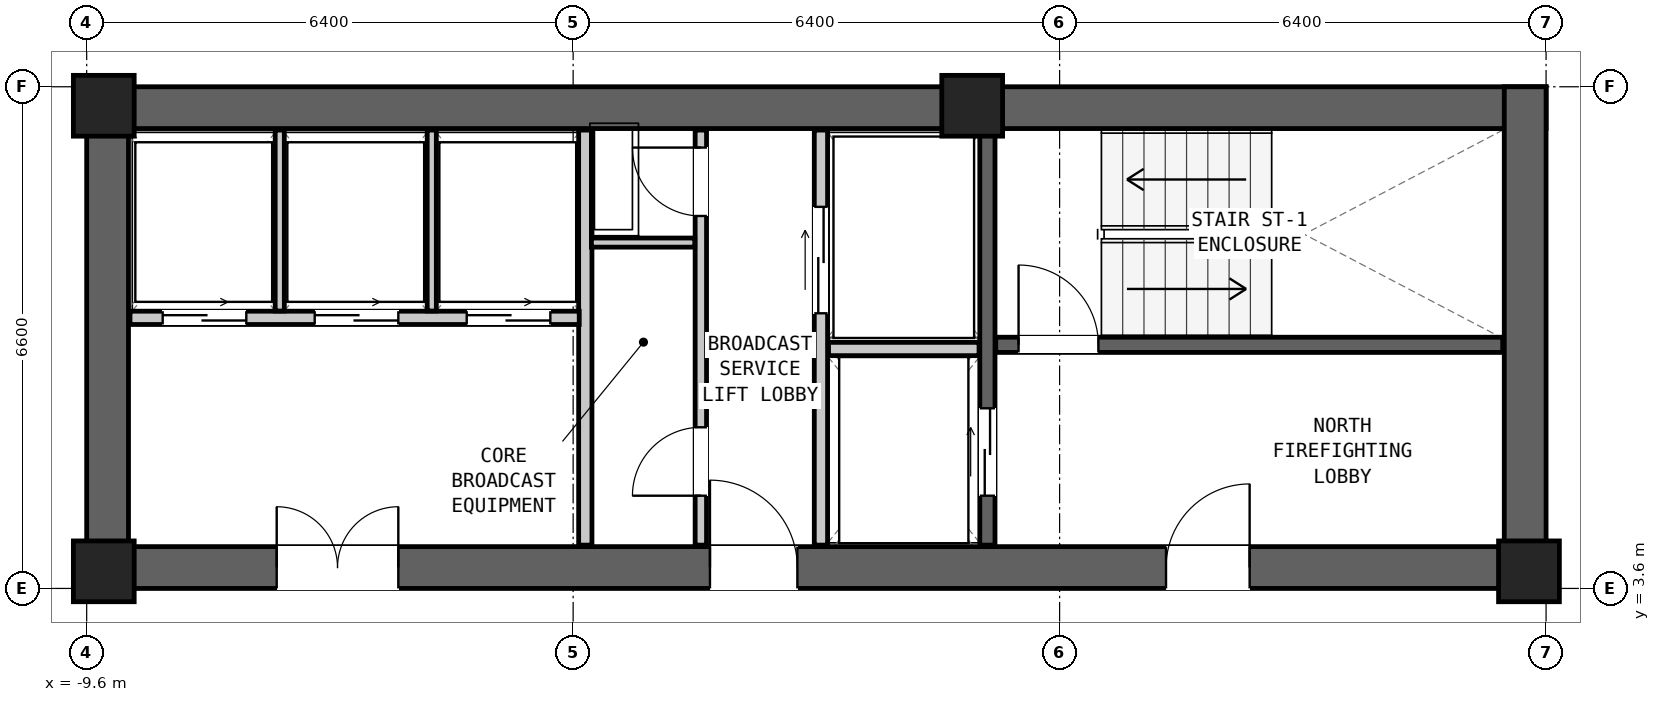
"""IFC4 building model, lengths in metres.
Left out: names, types, materials, properties, quantities, classifications, styles, units other than length and angle.
Written with IfcOpenShell. Run it as: python <this file> out.ifc"""

import sys

from ifc_helpers import new_model, si_unit, direction, frame, frame_2d, origin, origin_2d, place, context, subcontext, project, spatial, rectangle, extrude, element, fill, save


model = new_model("IFC4")
c1 = context("Model", 3, precision=1e-05, world=origin(), true_north=direction((0.0, 1.0)))
c2 = subcontext(c1, "Body", "Model", "MODEL_VIEW")
j1 = project(units=[si_unit("LENGTHUNIT", "METRE"), si_unit("PLANEANGLEUNIT", "RADIAN")], contexts=[c1])
p1 = place(None, origin())
s1 = spatial("IfcSite", under=j1, at=p1, CompositionType="ELEMENT")
p2 = place(p1, origin())
s2 = spatial("IfcBuilding", under=s1, at=p2, CompositionType="ELEMENT")
p3 = place(p2, frame((0.0, 0.0, 78.6)))
s3 = spatial("IfcBuildingStorey", under=s2, at=p3, CompositionType="ELEMENT", Elevation=78.6)
p4 = place(p3, frame((-9.6, 9.925, 0.0), z_axis=(0.0, 0.0, 1.0), x_axis=(1.0, 0.0, 0.0)))
e1 = element("IfcWall", 1, at=p4, inside=s3, PredefinedType="SHEAR", context=c2, shape_type="SweptSolid", body=[
    extrude(rectangle(XDim=19.2, YDim=0.55, at=frame_2d((9.6, 0.0))), origin(), (0.0, 0.0, 1.0), 3.05),
])
p5 = place(p3, frame((-9.6, 3.875, 0.0), z_axis=(0.0, 0.0, 1.0), x_axis=(1.0, 0.0, 0.0)))
e2 = element("IfcWall", 2, at=p5, inside=s3, PredefinedType="SHEAR", context=c2, shape_type="SweptSolid", body=[
    extrude(rectangle(XDim=19.2, YDim=0.55, at=frame_2d((9.6, 0.0))), origin(), (0.0, 0.0, 1.0), 3.05),
])
p6 = place(p5, frame((14.2, 0.0, 0.0)))
e3 = element("IfcOpeningElement", 3, at=p6, cuts=e2, PredefinedType="OPENING", context=c2, shape_type="SweptSolid", body=[
    extrude(rectangle(XDim=1.1, YDim=2.08, at=frame_2d((0.55, 1.04))), frame((0.0, 0.287, 0.0), z_axis=(0.0, -1.0, 0.0), x_axis=(1.0, 0.0, 0.0)), (0.0, 0.0, 1.0), 0.574),
])
p7 = place(p5, frame((8.2, 0.0, 0.0)))
e4 = element("IfcOpeningElement", 4, at=p7, cuts=e2, PredefinedType="OPENING", context=c2, shape_type="SweptSolid", body=[
    extrude(rectangle(XDim=1.15, YDim=2.1, at=frame_2d((0.575, 1.05))), frame((0.0, 0.287, 0.0), z_axis=(0.0, -1.0, 0.0), x_axis=(1.0, 0.0, 0.0)), (0.0, 0.0, 1.0), 0.574),
])
p8 = place(p5, frame((2.5, 0.0, 0.0)))
e5 = element("IfcOpeningElement", 5, at=p8, cuts=e2, PredefinedType="OPENING", context=c2, shape_type="SweptSolid", body=[
    extrude(rectangle(XDim=1.6, YDim=2.12, at=frame_2d((0.8, 1.06))), frame((0.0, 0.287, 0.0), z_axis=(0.0, -1.0, 0.0), x_axis=(1.0, 0.0, 0.0)), (0.0, 0.0, 1.0), 0.574),
])
for number, where, z_axis, x_axis in (
    (6, (-9.325, 3.6, 0.0), (0.0, 0.0, 1.0), (0.0, 1.0, 0.0)),
    (7, (9.325, 3.6, 0.0), (0.0, 0.0, 1.0), (0.0, 1.0, 0.0)),
):
    element("IfcWall", number, at=place(p3, frame(where, z_axis=z_axis, x_axis=x_axis)), inside=s3, PredefinedType="SHEAR", context=c2, shape_type="SweptSolid", body=[
        extrude(rectangle(XDim=6.6, YDim=0.55, at=frame_2d((3.3, 0.0))), origin(), (0.0, 0.0, 1.0), 3.05),
    ])
for number, where, z_axis, x_axis in (
    (8, (-9.375, 9.95, 0.0), (0.0, 0.0, 1.0), (1.0, 0.0, 0.0)),
    (9, (2.05, 9.95, 0.0), (0.0, 0.0, 1.0), (1.0, 0.0, 0.0)),
    (10, (-9.375, 3.825, 0.0), (0.0, 0.0, 1.0), (1.0, 0.0, 0.0)),
    (11, (9.375, 3.825, 0.0), (0.0, 0.0, 1.0), (1.0, 0.0, 0.0)),
):
    element("IfcColumn", number, at=place(p3, frame(where, z_axis=z_axis, x_axis=x_axis)), inside=s3, PredefinedType="COLUMN", context=c2, shape_type="SweptSolid", body=[
        extrude(rectangle(XDim=0.8, YDim=0.8, at=origin_2d()), origin(), (0.0, 0.0, 1.0), 3.05),
    ])
p9 = place(p3, frame((2.36, 6.805, 0.0), z_axis=(0.0, 0.0, 1.0), x_axis=(1.0, 0.0, 0.0)))
e12 = element("IfcWall", 12, at=p9, inside=s3, PredefinedType="SHEAR", context=c2, shape_type="SweptSolid", body=[
    extrude(rectangle(XDim=6.67, YDim=0.2, at=frame_2d((3.335, 0.0))), origin(), (0.0, 0.0, 1.0), 2.83),
])
p10 = place(p9, frame((0.3, 0.0, 0.0)))
e13 = element("IfcOpeningElement", 13, at=p10, cuts=e12, PredefinedType="OPENING", context=c2, shape_type="SweptSolid", body=[
    extrude(rectangle(XDim=1.05, YDim=2.08, at=frame_2d((0.525, 1.04))), frame((0.0, 0.112, 0.0), z_axis=(0.0, -1.0, 0.0), x_axis=(1.0, 0.0, 0.0)), (0.0, 0.0, 1.0), 0.224),
])
p11 = place(p3, frame((2.25, 4.17, 0.0), z_axis=(0.0, 0.0, 1.0), x_axis=(0.0, 1.0, 0.0)))
e14 = element("IfcWall", 14, at=p11, inside=s3, PredefinedType="SHEAR", context=c2, shape_type="SweptSolid", body=[
    extrude(rectangle(XDim=5.46, YDim=0.2, at=frame_2d((2.73, 0.0))), origin(), (0.0, 0.0, 1.0), 2.83),
])
p12 = place(p11, frame((0.65, 0.0, 0.0)))
e15 = element("IfcOpeningElement", 15, at=p12, cuts=e14, PredefinedType="OPENING", context=c2, shape_type="SweptSolid", body=[
    extrude(rectangle(XDim=1.15, YDim=2.08, at=frame_2d((0.575, 1.04))), frame((0.0, 0.112, 0.0), z_axis=(0.0, -1.0, 0.0), x_axis=(1.0, 0.0, 0.0)), (0.0, 0.0, 1.0), 0.224),
])
p13 = place(p3, frame((0.06, 4.17, 0.0), z_axis=(0.0, 0.0, 1.0), x_axis=(0.0, 1.0, 0.0)))
e16 = element("IfcWall", 16, at=p13, inside=s3, PredefinedType="PARTITIONING", context=c2, shape_type="SweptSolid", body=[
    extrude(rectangle(XDim=5.46, YDim=0.175, at=frame_2d((2.73, 0.0))), origin(), (0.0, 0.0, 1.0), 2.83),
])
p14 = place(p13, frame((3.05, 0.0, 0.0)))
e17 = element("IfcOpeningElement", 17, at=p14, cuts=e16, PredefinedType="OPENING", context=c2, shape_type="SweptSolid", body=[
    extrude(rectangle(XDim=1.4, YDim=2.12, at=frame_2d((0.7, 1.06))), frame((0.0, 0.1, 0.0), z_axis=(0.0, -1.0, 0.0), x_axis=(1.0, 0.0, 0.0)), (0.0, 0.0, 1.0), 0.199),
])
p15 = place(p3, frame((0.16, 6.75, 0.0), z_axis=(0.0, 0.0, 1.0), x_axis=(1.0, 0.0, 0.0)))
e18 = element("IfcWall", 18, at=p15, inside=s3, PredefinedType="PARTITIONING", context=c2, shape_type="SweptSolid", body=[
    extrude(rectangle(XDim=1.98, YDim=0.175, at=frame_2d((0.99, 0.0))), origin(), (0.0, 0.0, 1.0), 2.83),
])
p16 = place(p3, frame((-3.04, 4.17, 0.0), z_axis=(0.0, 0.0, 1.0), x_axis=(0.0, 1.0, 0.0)))
e19 = element("IfcWall", 19, at=p16, inside=s3, PredefinedType="PARTITIONING", context=c2, shape_type="SweptSolid", body=[
    extrude(rectangle(XDim=5.46, YDim=0.175, at=frame_2d((2.73, 0.0))), origin(), (0.0, 0.0, 1.0), 2.83),
])
p17 = place(p3, frame((-1.52, 4.17, 0.0), z_axis=(0.0, 0.0, 1.0), x_axis=(0.0, 1.0, 0.0)))
e20 = element("IfcWall", 20, at=p17, inside=s3, PredefinedType="PARTITIONING", context=c2, shape_type="SweptSolid", body=[
    extrude(rectangle(XDim=5.46, YDim=0.15, at=frame_2d((2.73, 0.0))), origin(), (0.0, 0.0, 1.0), 2.83),
])
p18 = place(p17, frame((4.33, 0.0, 0.0)))
e21 = element("IfcOpeningElement", 21, at=p18, cuts=e20, PredefinedType="OPENING", context=c2, shape_type="SweptSolid", body=[
    extrude(rectangle(XDim=0.9, YDim=2.05, at=frame_2d((0.45, 1.025))), frame((0.0, 0.087, 0.0), z_axis=(0.0, -1.0, 0.0), x_axis=(1.0, 0.0, 0.0)), (0.0, 0.0, 1.0), 0.174),
])
p19 = place(p17, frame((0.65, 0.0, 0.0)))
e22 = element("IfcOpeningElement", 22, at=p19, cuts=e20, PredefinedType="OPENING", context=c2, shape_type="SweptSolid", body=[
    extrude(rectangle(XDim=0.9, YDim=2.05, at=frame_2d((0.45, 1.025))), frame((0.0, 0.087, 0.0), z_axis=(0.0, -1.0, 0.0), x_axis=(1.0, 0.0, 0.0)), (0.0, 0.0, 1.0), 0.174),
])
p20 = place(p3, frame((-2.96, 8.15, 0.0), z_axis=(0.0, 0.0, 1.0), x_axis=(1.0, 0.0, 0.0)))
e23 = element("IfcWall", 23, at=p20, inside=s3, PredefinedType="PARTITIONING", context=c2, shape_type="SweptSolid", body=[
    extrude(rectangle(XDim=1.36, YDim=0.12, at=frame_2d((0.68, 0.0))), origin(), (0.0, 0.0, 1.0), 2.83),
])
p21 = place(p3, frame((-9.03, 7.16, 0.0), z_axis=(0.0, 0.0, 1.0), x_axis=(1.0, 0.0, 0.0)))
e24 = element("IfcWall", 24, at=p21, inside=s3, PredefinedType="PARTITIONING", context=c2, shape_type="SweptSolid", body=[
    extrude(rectangle(XDim=5.91, YDim=0.175, at=frame_2d((2.955, 0.0))), origin(), (0.0, 0.0, 1.0), 2.83),
])
p22 = place(p21, frame((0.43, 0.0, 0.0)))
e25 = element("IfcOpeningElement", 25, at=p22, cuts=e24, PredefinedType="OPENING", context=c2, shape_type="SweptSolid", body=[
    extrude(rectangle(XDim=1.1, YDim=2.06, at=frame_2d((0.55, 1.03))), frame((0.0, 0.1, 0.0), z_axis=(0.0, -1.0, 0.0), x_axis=(1.0, 0.0, 0.0)), (0.0, 0.0, 1.0), 0.199),
])
p23 = place(p21, frame((2.43, 0.0, 0.0)))
e26 = element("IfcOpeningElement", 26, at=p23, cuts=e24, PredefinedType="OPENING", context=c2, shape_type="SweptSolid", body=[
    extrude(rectangle(XDim=1.1, YDim=2.06, at=frame_2d((0.55, 1.03))), frame((0.0, 0.1, 0.0), z_axis=(0.0, -1.0, 0.0), x_axis=(1.0, 0.0, 0.0)), (0.0, 0.0, 1.0), 0.199),
])
p24 = place(p21, frame((4.43, 0.0, 0.0)))
e27 = element("IfcOpeningElement", 27, at=p24, cuts=e24, PredefinedType="OPENING", context=c2, shape_type="SweptSolid", body=[
    extrude(rectangle(XDim=1.1, YDim=2.06, at=frame_2d((0.55, 1.03))), frame((0.0, 0.1, 0.0), z_axis=(0.0, -1.0, 0.0), x_axis=(1.0, 0.0, 0.0)), (0.0, 0.0, 1.0), 0.199),
])
for number, where, z_axis, x_axis in (
    (28, (-7.06, 7.25, 0.0), (0.0, 0.0, 1.0), (0.0, 1.0, 0.0)),
    (29, (-5.06, 7.25, 0.0), (0.0, 0.0, 1.0), (0.0, 1.0, 0.0)),
):
    element("IfcWall", number, at=place(p3, frame(where, z_axis=z_axis, x_axis=x_axis)), inside=s3, PredefinedType="PARTITIONING", context=c2, shape_type="SweptSolid", body=[
        extrude(rectangle(XDim=2.38, YDim=0.12, at=frame_2d((1.19, 0.0))), origin(), (0.0, 0.0, 1.0), 2.83),
    ])
p25 = place(p10, origin())
e30 = element("IfcDoor", 30, at=p25, inside=s3, OperationType="SINGLE_SWING_LEFT", PredefinedType="DOOR", context=c2, shape_type="SweptSolid", body=[
    extrude(rectangle(XDim=1.05, YDim=2.08, at=frame_2d((0.525, 1.04))), frame((0.0, 0.025, 0.0), z_axis=(0.0, -1.0, 0.0), x_axis=(1.0, 0.0, 0.0)), (0.0, 0.0, 1.0), 0.05),
])
fill(e13, e30)
p26 = place(p6, origin())
e31 = element("IfcDoor", 31, at=p26, inside=s3, OperationType="SINGLE_SWING_RIGHT", PredefinedType="DOOR", context=c2, shape_type="SweptSolid", body=[
    extrude(rectangle(XDim=1.1, YDim=2.08, at=frame_2d((0.55, 1.04))), frame((0.0, 0.025, 0.0), z_axis=(0.0, -1.0, 0.0), x_axis=(1.0, 0.0, 0.0)), (0.0, 0.0, 1.0), 0.05),
])
fill(e3, e31)
p27 = place(p12, origin())
e32 = element("IfcDoor", 32, at=p27, inside=s3, OperationType="DOUBLE_DOOR_SLIDING", PredefinedType="DOOR", context=c2, shape_type="SweptSolid", body=[
    extrude(rectangle(XDim=1.15, YDim=2.08, at=frame_2d((0.575, 1.04))), frame((0.0, 0.025, 0.0), z_axis=(0.0, -1.0, 0.0), x_axis=(1.0, 0.0, 0.0)), (0.0, 0.0, 1.0), 0.05),
])
fill(e15, e32)
p28 = place(p14, origin())
e33 = element("IfcDoor", 33, at=p28, inside=s3, OperationType="DOUBLE_DOOR_SLIDING", PredefinedType="DOOR", context=c2, shape_type="SweptSolid", body=[
    extrude(rectangle(XDim=1.4, YDim=2.12, at=frame_2d((0.7, 1.06))), frame((0.0, 0.025, 0.0), z_axis=(0.0, -1.0, 0.0), x_axis=(1.0, 0.0, 0.0)), (0.0, 0.0, 1.0), 0.05),
])
fill(e17, e33)
p29 = place(p7, origin())
e34 = element("IfcDoor", 34, at=p29, inside=s3, OperationType="SINGLE_SWING_LEFT", PredefinedType="DOOR", context=c2, shape_type="SweptSolid", body=[
    extrude(rectangle(XDim=1.15, YDim=2.1, at=frame_2d((0.575, 1.05))), frame((0.0, 0.025, 0.0), z_axis=(0.0, -1.0, 0.0), x_axis=(1.0, 0.0, 0.0)), (0.0, 0.0, 1.0), 0.05),
])
fill(e4, e34)
p30 = place(p18, origin())
e35 = element("IfcDoor", 35, at=p30, inside=s3, OperationType="SINGLE_SWING_RIGHT", PredefinedType="DOOR", context=c2, shape_type="SweptSolid", body=[
    extrude(rectangle(XDim=0.9, YDim=2.05, at=frame_2d((0.45, 1.025))), frame((0.0, 0.025, 0.0), z_axis=(0.0, -1.0, 0.0), x_axis=(1.0, 0.0, 0.0)), (0.0, 0.0, 1.0), 0.05),
])
fill(e21, e35)
p31 = place(p19, origin())
e36 = element("IfcDoor", 36, at=p31, inside=s3, OperationType="SINGLE_SWING_LEFT", PredefinedType="DOOR", context=c2, shape_type="SweptSolid", body=[
    extrude(rectangle(XDim=0.9, YDim=2.05, at=frame_2d((0.45, 1.025))), frame((0.0, 0.025, 0.0), z_axis=(0.0, -1.0, 0.0), x_axis=(1.0, 0.0, 0.0)), (0.0, 0.0, 1.0), 0.05),
])
fill(e22, e36)
p32 = place(p22, origin())
e37 = element("IfcDoor", 37, at=p32, inside=s3, OperationType="DOUBLE_DOOR_SLIDING", PredefinedType="DOOR", context=c2, shape_type="SweptSolid", body=[
    extrude(rectangle(XDim=1.1, YDim=2.06, at=frame_2d((0.55, 1.03))), frame((0.0, 0.025, 0.0), z_axis=(0.0, -1.0, 0.0), x_axis=(1.0, 0.0, 0.0)), (0.0, 0.0, 1.0), 0.05),
])
fill(e25, e37)
p33 = place(p23, origin())
e38 = element("IfcDoor", 38, at=p33, inside=s3, OperationType="DOUBLE_DOOR_SLIDING", PredefinedType="DOOR", context=c2, shape_type="SweptSolid", body=[
    extrude(rectangle(XDim=1.1, YDim=2.06, at=frame_2d((0.55, 1.03))), frame((0.0, 0.025, 0.0), z_axis=(0.0, -1.0, 0.0), x_axis=(1.0, 0.0, 0.0)), (0.0, 0.0, 1.0), 0.05),
])
fill(e26, e38)
p34 = place(p24, origin())
e39 = element("IfcDoor", 39, at=p34, inside=s3, OperationType="DOUBLE_DOOR_SLIDING", PredefinedType="DOOR", context=c2, shape_type="SweptSolid", body=[
    extrude(rectangle(XDim=1.1, YDim=2.06, at=frame_2d((0.55, 1.03))), frame((0.0, 0.025, 0.0), z_axis=(0.0, -1.0, 0.0), x_axis=(1.0, 0.0, 0.0)), (0.0, 0.0, 1.0), 0.05),
])
fill(e27, e39)
p35 = place(p8, origin())
e40 = element("IfcDoor", 40, at=p35, inside=s3, OperationType="DOUBLE_DOOR_SINGLE_SWING", PredefinedType="DOOR", context=c2, shape_type="SweptSolid", body=[
    extrude(rectangle(XDim=1.6, YDim=2.12, at=frame_2d((0.8, 1.06))), frame((0.0, 0.025, 0.0), z_axis=(0.0, -1.0, 0.0), x_axis=(1.0, 0.0, 0.0)), (0.0, 0.0, 1.0), 0.05),
])
fill(e5, e40)
save(model, sys.argv[1])
